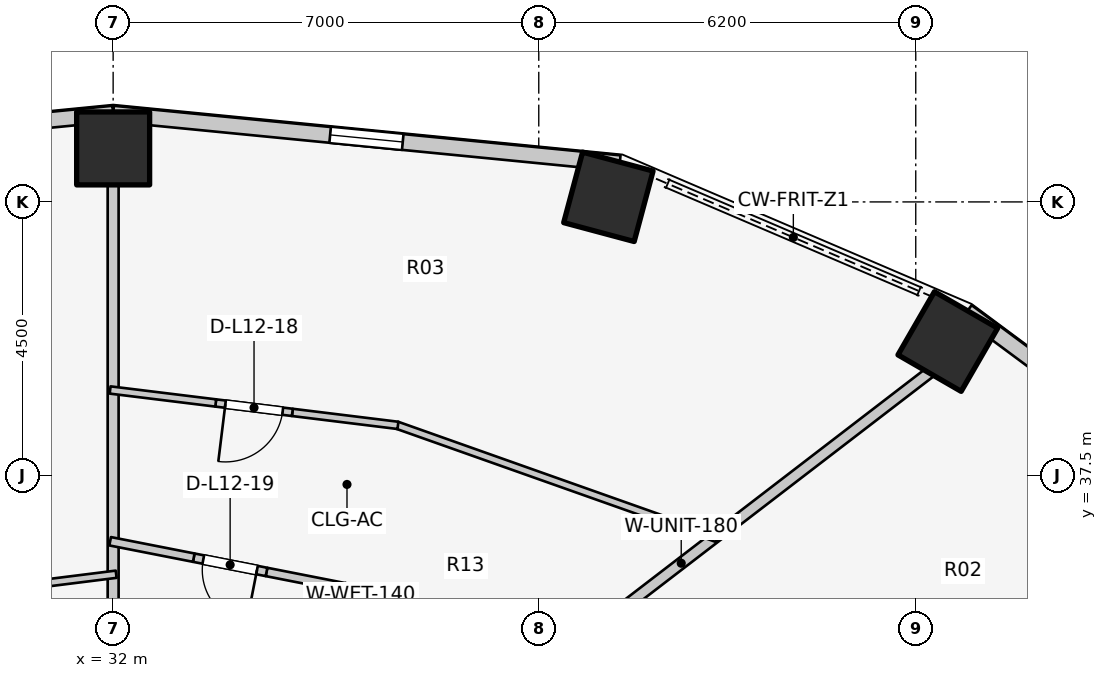
"""IFC4 building model, lengths in metres.
Left out: names, types, materials, properties, quantities, classifications, styles, units other than length and angle.
Written with IfcOpenShell. Run it as: python <this file> out.ifc"""

import sys

from ifc_helpers import new_model, si_unit, direction, frame, frame_2d, origin, origin_2d, place, context, subcontext, project, spatial, rectangle, extrude, element, fill, save


model = new_model("IFC4")
c1 = context("Model", 3, precision=1e-05, world=origin(), true_north=direction((0.0, 1.0)))
c2 = subcontext(c1, "Body", "Model", "MODEL_VIEW")
j1 = project(units=[si_unit("LENGTHUNIT", "METRE"), si_unit("PLANEANGLEUNIT", "RADIAN")], contexts=[c1])
p1 = place(None, origin())
s1 = spatial("IfcSite", under=j1, at=p1, CompositionType="ELEMENT")
p2 = place(p1, origin())
s2 = spatial("IfcBuilding", under=s1, at=p2, CompositionType="ELEMENT")
p3 = place(p2, frame((0.0, 0.0, 43.1)))
s3 = spatial("IfcBuildingStorey", under=s2, at=p3, CompositionType="ELEMENT", Elevation=43.1)
for number, where, z_axis, x_axis in (
    (1, (45.727, 39.704, 0.0), (0.0, 0.0, 1.0), (0.5, 0.866, 0.0)),
    (2, (40.145, 42.084, 0.0), (0.0, 0.0, 1.0), (0.259, 0.966, 0.0)),
    (3, (32.0, 42.88, 0.0), (0.0, 0.0, 1.0), (0.0, 1.0, 0.0)),
):
    element("IfcColumn", number, at=place(p3, frame(where, z_axis=z_axis, x_axis=x_axis)), inside=s3, PredefinedType="COLUMN", context=c2, shape_type="SweptSolid", body=[
        extrude(rectangle(XDim=1.2, YDim=1.2, at=origin_2d()), origin(), (0.0, 0.0, 1.0), 3.1),
    ])
p4 = place(p3, frame((50.405, 36.965, 0.0), z_axis=(0.0, 0.0, 1.0), x_axis=(-0.803477531792, 0.595335078679, 0.0)))
e4 = element("IfcWall", 4, at=p4, inside=s3, PredefinedType="STANDARD", context=c2, shape_type="SweptSolid", body=[
    extrude(rectangle(XDim=5.43, YDim=0.26, at=frame_2d((2.715, 0.0))), origin(), (0.0, 0.0, 1.0), 1.22),
])
p5 = place(p3, frame((40.332, 42.636, 0.0), z_axis=(0.0, 0.0, 1.0), x_axis=(-0.995247718352, 0.097375454379, 0.0)))
e5 = element("IfcWall", 5, at=p5, inside=s3, PredefinedType="STANDARD", context=c2, shape_type="SweptSolid", body=[
    extrude(rectangle(XDim=8.372, YDim=0.26, at=frame_2d((4.186, 0.0))), origin(), (0.0, 0.0, 1.0), 1.22),
])
p6 = place(p5, frame((3.586, 0.0, 0.15)))
e6 = element("IfcOpeningElement", 6, at=p6, cuts=e5, PredefinedType="OPENING", context=c2, shape_type="SweptSolid", body=[
    extrude(rectangle(XDim=1.2, YDim=0.9, at=frame_2d((0.6, 0.45))), frame((0.0, 0.14, 0.0), z_axis=(0.0, -1.0, 0.0), x_axis=(1.0, 0.0, 0.0)), (0.0, 0.0, 1.0), 0.28),
])
p7 = place(p3, frame((32.0, 43.451, 0.0), z_axis=(0.0, 0.0, 1.0), x_axis=(-0.995247718352, -0.097375454379, 0.0)))
e7 = element("IfcWall", 7, at=p7, inside=s3, PredefinedType="STANDARD", context=c2, shape_type="SweptSolid", body=[
    extrude(rectangle(XDim=8.372, YDim=0.26, at=frame_2d((4.186, 0.0))), origin(), (0.0, 0.0, 1.0), 1.22),
])
p8 = place(p7, frame((3.586, 0.0, 0.15)))
e8 = element("IfcOpeningElement", 8, at=p8, cuts=e7, PredefinedType="OPENING", context=c2, shape_type="SweptSolid", body=[
    extrude(rectangle(XDim=1.2, YDim=0.9, at=frame_2d((0.6, 0.45))), frame((0.0, 0.14, 0.0), z_axis=(0.0, -1.0, 0.0), x_axis=(1.0, 0.0, 0.0)), (0.0, 0.0, 1.0), 0.28),
])
p9 = place(p3, frame((37.249, 32.915, 0.0), z_axis=(0.0, 0.0, 1.0), x_axis=(0.793181014702, 0.608985942298, 0.0)))
e9 = element("IfcWall", 9, at=p9, inside=s3, PredefinedType="PARTITIONING", context=c2, shape_type="SweptSolid", body=[
    extrude(rectangle(XDim=10.324, YDim=0.18, at=frame_2d((5.162, 0.0))), origin(), (0.0, 0.0, 1.0), 1.22),
])
p10 = place(p3, frame((32.0, 34.465, 0.0), z_axis=(0.0, 0.0, 1.0), x_axis=(0.0, 1.0, 0.0)))
e10 = element("IfcWall", 10, at=p10, inside=s3, PredefinedType="PARTITIONING", context=c2, shape_type="SweptSolid", body=[
    extrude(rectangle(XDim=7.835, YDim=0.18, at=frame_2d((3.917, 0.0))), origin(), (0.0, 0.0, 1.0), 1.22),
])
p11 = place(p3, frame((41.938, 36.462, 0.0), z_axis=(0.0, 0.0, 1.0), x_axis=(-0.942654689305, 0.333769586287, 0.0)))
e11 = element("IfcWall", 11, at=p11, inside=s3, PredefinedType="MOVABLE", context=c2, shape_type="SweptSolid", body=[
    extrude(rectangle(XDim=5.594, YDim=0.12, at=frame_2d((2.797, 0.0))), origin(), (0.0, 0.0, 1.0), 1.22),
])
p12 = place(p3, frame((36.684, 38.325, 0.0), z_axis=(0.0, 0.0, 1.0), x_axis=(-0.992516476292, 0.122110786945, 0.0)))
e12 = element("IfcWall", 12, at=p12, inside=s3, PredefinedType="MOVABLE", context=c2, shape_type="SweptSolid", body=[
    extrude(rectangle(XDim=1.75, YDim=0.12, at=frame_2d((0.875, 0.0))), origin(), (0.0, 0.0, 1.0), 2.575),
])
p13 = place(p3, frame((34.948, 38.539, 0.0), z_axis=(0.0, 0.0, 1.0), x_axis=(-0.992544679326, 0.121881333855, 0.0)))
e13 = element("IfcWall", 13, at=p13, inside=s3, PredefinedType="MOVABLE", context=c2, shape_type="SweptSolid", body=[
    extrude(rectangle(XDim=1.27, YDim=0.12, at=frame_2d((0.635, 0.0))), origin(), (0.0, 0.0, 1.0), 2.575),
])
p14 = place(p13, frame((0.16, 0.0, 0.0)))
e14 = element("IfcOpeningElement", 14, at=p14, cuts=e13, PredefinedType="OPENING", context=c2, shape_type="SweptSolid", body=[
    extrude(rectangle(XDim=0.95, YDim=2.1, at=frame_2d((0.475, 1.05))), frame((0.0, 0.07, 0.0), z_axis=(0.0, -1.0, 0.0), x_axis=(1.0, 0.0, 0.0)), (0.0, 0.0, 1.0), 0.14),
])
p15 = place(p3, frame((33.687, 38.694, 0.0), z_axis=(0.0, 0.0, 1.0), x_axis=(-0.992518556774, 0.122093875605, 0.0)))
e15 = element("IfcWall", 15, at=p15, inside=s3, PredefinedType="MOVABLE", context=c2, shape_type="SweptSolid", body=[
    extrude(rectangle(XDim=1.75, YDim=0.12, at=frame_2d((0.875, 0.0))), origin(), (0.0, 0.0, 1.0), 1.22),
])
p16 = place(p3, frame((34.665, 33.98, 0.0), z_axis=(0.0, 0.0, 1.0), x_axis=(0.577139575342, 0.816645523207, 0.0)))
e16 = element("IfcWall", 16, at=p16, inside=s3, PredefinedType="PLUMBINGWALL", context=c2, shape_type="SweptSolid", body=[
    extrude(rectangle(XDim=2.1, YDim=0.14, at=frame_2d((1.05, 0.0))), origin(), (0.0, 0.0, 1.0), 2.575),
])
p17 = place(p3, frame((35.897, 35.645, 0.0), z_axis=(0.0, 0.0, 1.0), x_axis=(-0.981284705137, 0.192562528712, 0.0)))
e17 = element("IfcWall", 17, at=p17, inside=s3, PredefinedType="PLUMBINGWALL", context=c2, shape_type="SweptSolid", body=[
    extrude(rectangle(XDim=1.401, YDim=0.14, at=frame_2d((0.7, 0.0))), origin(), (0.0, 0.0, 1.0), 1.22),
])
p18 = place(p3, frame((34.523, 35.915, 0.0), z_axis=(0.0, 0.0, 1.0), x_axis=(-0.981252199958, 0.192728098829, 0.0)))
e18 = element("IfcWall", 18, at=p18, inside=s3, PredefinedType="PLUMBINGWALL", context=c2, shape_type="SweptSolid", body=[
    extrude(rectangle(XDim=1.22, YDim=0.14, at=frame_2d((0.61, 0.0))), origin(), (0.0, 0.0, 1.0), 2.575),
])
p19 = place(p18, frame((0.16, 0.0, 0.0)))
e19 = element("IfcOpeningElement", 19, at=p19, cuts=e18, PredefinedType="OPENING", context=c2, shape_type="SweptSolid", body=[
    extrude(rectangle(XDim=0.9, YDim=2.1, at=frame_2d((0.45, 1.05))), frame((0.0, 0.08, 0.0), z_axis=(0.0, -1.0, 0.0), x_axis=(1.0, 0.0, 0.0)), (0.0, 0.0, 1.0), 0.16),
])
p20 = place(p3, frame((33.326, 36.15, 0.0), z_axis=(0.0, 0.0, 1.0), x_axis=(-0.981284705137, 0.192562528712, 0.0)))
e20 = element("IfcWall", 20, at=p20, inside=s3, PredefinedType="PLUMBINGWALL", context=c2, shape_type="SweptSolid", body=[
    extrude(rectangle(XDim=1.401, YDim=0.14, at=frame_2d((0.7, 0.0))), origin(), (0.0, 0.0, 1.0), 1.22),
])
p21 = place(p3, frame((32.05, 35.877, 0.0), z_axis=(0.0, 0.0, 1.0), x_axis=(-0.992251181548, -0.124248109512, 0.0)))
e21 = element("IfcWall", 21, at=p21, inside=s3, PredefinedType="MOVABLE", context=c2, shape_type="SweptSolid", body=[
    extrude(rectangle(XDim=1.267, YDim=0.12, at=frame_2d((0.634, 0.0))), origin(), (0.0, 0.0, 1.0), 1.22),
])
p22 = place(p6, origin())
e22 = element("IfcWindow", 22, at=p22, inside=s3, PartitioningType="SINGLE_PANEL", PredefinedType="WINDOW", context=c2, shape_type="SweptSolid", body=[
    extrude(rectangle(XDim=1.2, YDim=0.9, at=frame_2d((0.6, 0.45))), frame((0.0, 0.03, 0.0), z_axis=(0.0, -1.0, 0.0), x_axis=(1.0, 0.0, 0.0)), (0.0, 0.0, 1.0), 0.06),
])
fill(e6, e22)
p23 = place(p14, origin())
e23 = element("IfcDoor", 23, at=p23, inside=s3, OperationType="SINGLE_SWING_RIGHT", PredefinedType="DOOR", context=c2, shape_type="SweptSolid", body=[
    extrude(rectangle(XDim=0.95, YDim=2.1, at=frame_2d((0.475, 1.05))), frame((0.0, 0.025, 0.0), z_axis=(0.0, -1.0, 0.0), x_axis=(1.0, 0.0, 0.0)), (0.0, 0.0, 1.0), 0.05),
])
fill(e14, e23)
p24 = place(p19, origin())
e24 = element("IfcDoor", 24, at=p24, inside=s3, OperationType="SINGLE_SWING_LEFT", PredefinedType="DOOR", context=c2, shape_type="SweptSolid", body=[
    extrude(rectangle(XDim=0.9, YDim=2.1, at=frame_2d((0.45, 1.05))), frame((0.0, 0.025, 0.0), z_axis=(0.0, -1.0, 0.0), x_axis=(1.0, 0.0, 0.0)), (0.0, 0.0, 1.0), 0.05),
])
fill(e19, e24)
save(model, sys.argv[1])
